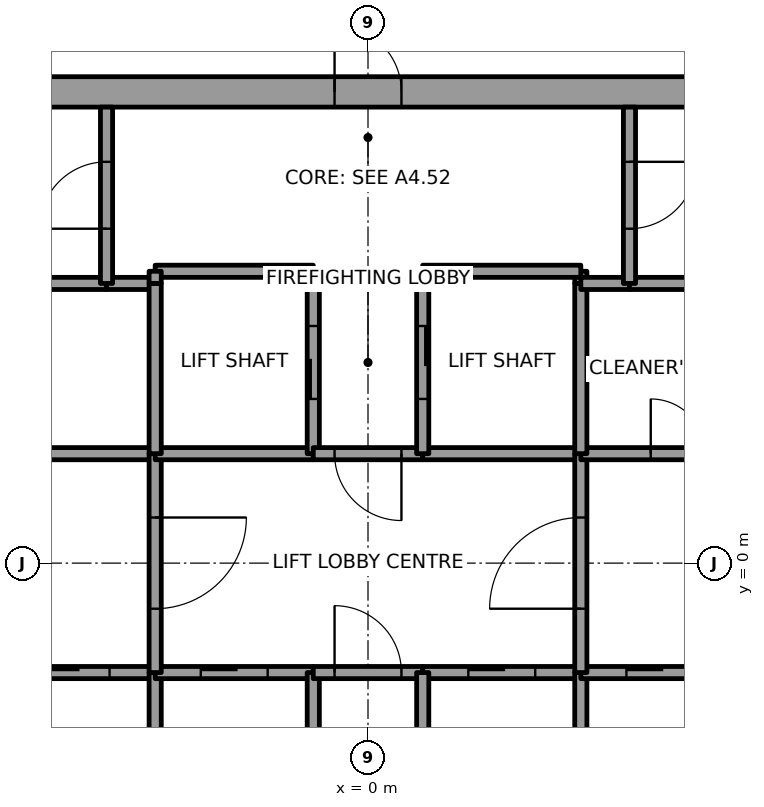
"""IFC4 building model, lengths in metres.
Left out: names, types, materials, properties, quantities, classifications, styles, units other than length and angle.
Written with IfcOpenShell. Run it as: python <this file> out.ifc"""

import sys

from ifc_helpers import new_model, si_unit, direction, frame, frame_2d, origin, place, context, subcontext, project, spatial, rectangle, extrude, element, fill, save


model = new_model("IFC4")
c1 = context("Model", 3, precision=1e-05, world=origin(), true_north=direction((0.0, 1.0)))
c2 = subcontext(c1, "Body", "Model", "MODEL_VIEW")
j1 = project(units=[si_unit("LENGTHUNIT", "METRE"), si_unit("PLANEANGLEUNIT", "RADIAN")], contexts=[c1])
p1 = place(None, origin())
s1 = spatial("IfcSite", under=j1, at=p1, CompositionType="ELEMENT")
p2 = place(p1, origin())
s2 = spatial("IfcBuilding", under=s1, at=p2, CompositionType="ELEMENT")
p3 = place(p2, frame((0.0, 0.0, 227.0)))
s3 = spatial("IfcBuildingStorey", under=s2, at=p3, CompositionType="ELEMENT", Elevation=227.0)
p4 = place(p3, frame((-11.0, 7.75, 0.0), z_axis=(0.0, 0.0, 1.0), x_axis=(1.0, 0.0, 0.0)))
e1 = element("IfcWall", 1, at=p4, inside=s3, PredefinedType="SHEAR", context=c2, shape_type="SweptSolid", body=[
    extrude(rectangle(XDim=22.0, YDim=0.5, at=frame_2d((11.0, 0.0))), origin(), (0.0, 0.0, 1.0), 4.0),
])
p5 = place(p4, frame((10.45, 0.0, 0.0)))
e2 = element("IfcOpeningElement", 2, at=p5, cuts=e1, PredefinedType="OPENING", context=c2, shape_type="SweptSolid", body=[
    extrude(rectangle(XDim=1.1, YDim=2.1, at=frame_2d((0.55, 1.05))), frame((0.0, 0.25, 0.0), z_axis=(0.0, -1.0, 0.0), x_axis=(1.0, 0.0, 0.0)), (0.0, 0.0, 1.0), 0.5),
])
p6 = place(p3, frame((-8.7, 1.8, 0.0), z_axis=(0.0, 0.0, 1.0), x_axis=(1.0, 0.0, 0.0)))
e3 = element("IfcWall", 3, at=p6, inside=s3, PredefinedType="SOLIDWALL", context=c2, shape_type="SweptSolid", body=[
    extrude(rectangle(XDim=5.2, YDim=0.2, at=frame_2d((2.6, 0.0))), origin(), (0.0, 0.0, 1.0), 3.85),
])
p7 = place(p6, frame((2.15, 0.0, 0.0)))
e4 = element("IfcOpeningElement", 4, at=p7, cuts=e3, PredefinedType="OPENING", context=c2, shape_type="SweptSolid", body=[
    extrude(rectangle(XDim=0.9, YDim=2.1, at=frame_2d((0.45, 1.05))), frame((0.0, 0.1, 0.0), z_axis=(0.0, -1.0, 0.0), x_axis=(1.0, 0.0, 0.0)), (0.0, 0.0, 1.0), 0.2),
])
p8 = place(p3, frame((-4.3, 4.6, 0.0), z_axis=(0.0, 0.0, 1.0), x_axis=(-1.0, 0.0, 0.0)))
e5 = element("IfcWall", 5, at=p8, inside=s3, PredefinedType="SOLIDWALL", context=c2, shape_type="SweptSolid", body=[
    extrude(rectangle(XDim=4.4, YDim=0.2, at=frame_2d((2.2, 0.0))), origin(), (0.0, 0.0, 1.0), 3.85),
])
p9 = place(p3, frame((-6.1, -1.8, 0.0), z_axis=(0.0, 0.0, 1.0), x_axis=(1.0, 0.0, 0.0)))
e6 = element("IfcWall", 6, at=p9, inside=s3, PredefinedType="SOLIDWALL", context=c2, shape_type="SweptSolid", body=[
    extrude(rectangle(XDim=2.6, YDim=0.2, at=frame_2d((1.3, 0.0))), origin(), (0.0, 0.0, 1.0), 3.85),
])
p10 = place(p9, frame((0.75, 0.0, 0.0)))
e7 = element("IfcOpeningElement", 7, at=p10, cuts=e6, PredefinedType="OPENING", context=c2, shape_type="SweptSolid", body=[
    extrude(rectangle(XDim=1.1, YDim=2.1, at=frame_2d((0.55, 1.05))), frame((0.0, 0.1, 0.0), z_axis=(0.0, -1.0, 0.0), x_axis=(1.0, 0.0, 0.0)), (0.0, 0.0, 1.0), 0.2),
])
p11 = place(p3, frame((-3.5, 4.6, 0.0), z_axis=(0.0, 0.0, 1.0), x_axis=(-1.0, 0.0, 0.0)))
e8 = element("IfcWall", 8, at=p11, inside=s3, PredefinedType="SOLIDWALL", context=c2, shape_type="SweptSolid", body=[
    extrude(rectangle(XDim=0.8, YDim=0.2, at=frame_2d((0.4, 0.0))), origin(), (0.0, 0.0, 1.0), 3.85),
])
p12 = place(p3, frame((-4.3, 4.6, 0.0), z_axis=(0.0, 0.0, 1.0), x_axis=(0.0, 1.0, 0.0)))
e9 = element("IfcWall", 9, at=p12, inside=s3, PredefinedType="SOLIDWALL", context=c2, shape_type="SweptSolid", body=[
    extrude(rectangle(XDim=2.9, YDim=0.2, at=frame_2d((1.45, 0.0))), origin(), (0.0, 0.0, 1.0), 3.85),
])
p13 = place(p12, frame((0.9, 0.0, 0.0)))
e10 = element("IfcOpeningElement", 10, at=p13, cuts=e9, PredefinedType="OPENING", context=c2, shape_type="SweptSolid", body=[
    extrude(rectangle(XDim=1.1, YDim=2.1, at=frame_2d((0.55, 1.05))), frame((0.0, 0.1, 0.0), z_axis=(0.0, -1.0, 0.0), x_axis=(1.0, 0.0, 0.0)), (0.0, 0.0, 1.0), 0.2),
])
p14 = place(p3, frame((-3.5, -4.6, 0.0), z_axis=(0.0, 0.0, 1.0), x_axis=(0.0, 1.0, 0.0)))
e11 = element("IfcWall", 11, at=p14, inside=s3, PredefinedType="SOLIDWALL", context=c2, shape_type="SweptSolid", body=[
    extrude(rectangle(XDim=2.8, YDim=0.2, at=frame_2d((1.4, 0.0))), origin(), (0.0, 0.0, 1.0), 3.85),
])
p15 = place(p3, frame((-3.5, -1.8, 0.0), z_axis=(0.0, 0.0, 1.0), x_axis=(1.0, 0.0, 0.0)))
e12 = element("IfcWall", 12, at=p15, inside=s3, PredefinedType="SOLIDWALL", context=c2, shape_type="SweptSolid", body=[
    extrude(rectangle(XDim=2.6, YDim=0.2, at=frame_2d((1.3, 0.0))), origin(), (0.0, 0.0, 1.0), 3.85),
])
p16 = place(p15, frame((0.75, 0.0, 0.0)))
e13 = element("IfcOpeningElement", 13, at=p16, cuts=e12, PredefinedType="OPENING", context=c2, shape_type="SweptSolid", body=[
    extrude(rectangle(XDim=1.1, YDim=2.1, at=frame_2d((0.55, 1.05))), frame((0.0, 0.1, 0.0), z_axis=(0.0, -1.0, 0.0), x_axis=(1.0, 0.0, 0.0)), (0.0, 0.0, 1.0), 0.2),
])
p17 = place(p3, frame((-3.5, 1.8, 0.0), z_axis=(0.0, 0.0, 1.0), x_axis=(0.0, -1.0, 0.0)))
e14 = element("IfcWall", 14, at=p17, inside=s3, PredefinedType="SOLIDWALL", context=c2, shape_type="SweptSolid", body=[
    extrude(rectangle(XDim=3.6, YDim=0.2, at=frame_2d((1.8, 0.0))), origin(), (0.0, 0.0, 1.0), 3.85),
])
p18 = place(p17, frame((1.05, 0.0, 0.0)))
e15 = element("IfcOpeningElement", 15, at=p18, cuts=e14, PredefinedType="OPENING", context=c2, shape_type="SweptSolid", body=[
    extrude(rectangle(XDim=1.5, YDim=2.1, at=frame_2d((0.75, 1.05))), frame((0.0, 0.1, 0.0), z_axis=(0.0, -1.0, 0.0), x_axis=(1.0, 0.0, 0.0)), (0.0, 0.0, 1.0), 0.2),
])
p19 = place(p3, frame((-0.9, 1.8, 0.0), z_axis=(0.0, 0.0, 1.0), x_axis=(-1.0, 0.0, 0.0)))
e16 = element("IfcWall", 16, at=p19, inside=s3, PredefinedType="SOLIDWALL", context=c2, shape_type="SweptSolid", body=[
    extrude(rectangle(XDim=2.6, YDim=0.2, at=frame_2d((1.3, 0.0))), origin(), (0.0, 0.0, 1.0), 3.85),
])
p20 = place(p3, frame((-3.5, 1.8, 0.0), z_axis=(0.0, 0.0, 1.0), x_axis=(0.0, 1.0, 0.0)))
e17 = element("IfcWall", 17, at=p20, inside=s3, PredefinedType="SOLIDWALL", context=c2, shape_type="SweptSolid", body=[
    extrude(rectangle(XDim=2.8, YDim=0.2, at=frame_2d((1.4, 0.0))), origin(), (0.0, 0.0, 1.0), 3.85),
])
p21 = place(p3, frame((-0.9, 1.8, 0.0), z_axis=(0.0, 0.0, 1.0), x_axis=(0.0, 1.0, 0.0)))
e18 = element("IfcWall", 18, at=p21, inside=s3, PredefinedType="SOLIDWALL", context=c2, shape_type="SweptSolid", body=[
    extrude(rectangle(XDim=3.0, YDim=0.2, at=frame_2d((1.5, 0.0))), origin(), (0.0, 0.0, 1.0), 3.85),
])
p22 = place(p21, frame((0.9, 0.0, 0.0)))
e19 = element("IfcOpeningElement", 19, at=p22, cuts=e18, PredefinedType="OPENING", context=c2, shape_type="SweptSolid", body=[
    extrude(rectangle(XDim=1.2, YDim=2.1, at=frame_2d((0.6, 1.05))), frame((0.0, 0.1, 0.0), z_axis=(0.0, -1.0, 0.0), x_axis=(1.0, 0.0, 0.0)), (0.0, 0.0, 1.0), 0.2),
])
p23 = place(p3, frame((-0.9, 4.8, 0.0), z_axis=(0.0, 0.0, 1.0), x_axis=(-1.0, 0.0, 0.0)))
e20 = element("IfcWall", 20, at=p23, inside=s3, PredefinedType="SOLIDWALL", context=c2, shape_type="SweptSolid", body=[
    extrude(rectangle(XDim=2.6, YDim=0.2, at=frame_2d((1.3, 0.0))), origin(), (0.0, 0.0, 1.0), 3.85),
])
p24 = place(p3, frame((-3.5, 4.8, 0.0), z_axis=(0.0, 0.0, 1.0), x_axis=(0.0, -1.0, 0.0)))
e21 = element("IfcWall", 21, at=p24, inside=s3, PredefinedType="SOLIDWALL", context=c2, shape_type="SweptSolid", body=[
    extrude(rectangle(XDim=0.2, YDim=0.2, at=frame_2d((0.1, 0.0))), origin(), (0.0, 0.0, 1.0), 3.85),
])
p25 = place(p3, frame((-0.9, -4.6, 0.0), z_axis=(0.0, 0.0, 1.0), x_axis=(0.0, 1.0, 0.0)))
e22 = element("IfcWall", 22, at=p25, inside=s3, PredefinedType="SOLIDWALL", context=c2, shape_type="SweptSolid", body=[
    extrude(rectangle(XDim=2.8, YDim=0.2, at=frame_2d((1.4, 0.0))), origin(), (0.0, 0.0, 1.0), 3.85),
])
p26 = place(p3, frame((-0.9, -1.8, 0.0), z_axis=(0.0, 0.0, 1.0), x_axis=(1.0, 0.0, 0.0)))
e23 = element("IfcWall", 23, at=p26, inside=s3, PredefinedType="SOLIDWALL", context=c2, shape_type="SweptSolid", body=[
    extrude(rectangle(XDim=1.8, YDim=0.2, at=frame_2d((0.9, 0.0))), origin(), (0.0, 0.0, 1.0), 3.85),
])
p27 = place(p26, frame((0.35, 0.0, 0.0)))
e24 = element("IfcOpeningElement", 24, at=p27, cuts=e23, PredefinedType="OPENING", context=c2, shape_type="SweptSolid", body=[
    extrude(rectangle(XDim=1.1, YDim=2.1, at=frame_2d((0.55, 1.05))), frame((0.0, 0.1, 0.0), z_axis=(0.0, -1.0, 0.0), x_axis=(1.0, 0.0, 0.0)), (0.0, 0.0, 1.0), 0.2),
])
p28 = place(p3, frame((0.9, 1.8, 0.0), z_axis=(0.0, 0.0, 1.0), x_axis=(-1.0, 0.0, 0.0)))
e25 = element("IfcWall", 25, at=p28, inside=s3, PredefinedType="SOLIDWALL", context=c2, shape_type="SweptSolid", body=[
    extrude(rectangle(XDim=1.8, YDim=0.2, at=frame_2d((0.9, 0.0))), origin(), (0.0, 0.0, 1.0), 3.85),
])
p29 = place(p28, frame((0.35, 0.0, 0.0)))
e26 = element("IfcOpeningElement", 26, at=p29, cuts=e25, PredefinedType="OPENING", context=c2, shape_type="SweptSolid", body=[
    extrude(rectangle(XDim=1.1, YDim=2.1, at=frame_2d((0.55, 1.05))), frame((0.0, 0.1, 0.0), z_axis=(0.0, -1.0, 0.0), x_axis=(1.0, 0.0, 0.0)), (0.0, 0.0, 1.0), 0.2),
])
p30 = place(p3, frame((0.9, -1.8, 0.0), z_axis=(0.0, 0.0, 1.0), x_axis=(1.0, 0.0, 0.0)))
e27 = element("IfcWall", 27, at=p30, inside=s3, PredefinedType="SOLIDWALL", context=c2, shape_type="SweptSolid", body=[
    extrude(rectangle(XDim=2.6, YDim=0.2, at=frame_2d((1.3, 0.0))), origin(), (0.0, 0.0, 1.0), 3.85),
])
p31 = place(p30, frame((0.75, 0.0, 0.0)))
e28 = element("IfcOpeningElement", 28, at=p31, cuts=e27, PredefinedType="OPENING", context=c2, shape_type="SweptSolid", body=[
    extrude(rectangle(XDim=1.1, YDim=2.1, at=frame_2d((0.55, 1.05))), frame((0.0, 0.1, 0.0), z_axis=(0.0, -1.0, 0.0), x_axis=(1.0, 0.0, 0.0)), (0.0, 0.0, 1.0), 0.2),
])
p32 = place(p3, frame((0.9, -1.8, 0.0), z_axis=(0.0, 0.0, 1.0), x_axis=(0.0, -1.0, 0.0)))
e29 = element("IfcWall", 29, at=p32, inside=s3, PredefinedType="SOLIDWALL", context=c2, shape_type="SweptSolid", body=[
    extrude(rectangle(XDim=2.8, YDim=0.2, at=frame_2d((1.4, 0.0))), origin(), (0.0, 0.0, 1.0), 3.85),
])
p33 = place(p3, frame((3.5, 1.8, 0.0), z_axis=(0.0, 0.0, 1.0), x_axis=(-1.0, 0.0, 0.0)))
e30 = element("IfcWall", 30, at=p33, inside=s3, PredefinedType="SOLIDWALL", context=c2, shape_type="SweptSolid", body=[
    extrude(rectangle(XDim=2.6, YDim=0.2, at=frame_2d((1.3, 0.0))), origin(), (0.0, 0.0, 1.0), 3.85),
])
p34 = place(p3, frame((3.5, 4.6, 0.0), z_axis=(0.0, 0.0, 1.0), x_axis=(0.0, 1.0, 0.0)))
e31 = element("IfcWall", 31, at=p34, inside=s3, PredefinedType="SOLIDWALL", context=c2, shape_type="SweptSolid", body=[
    extrude(rectangle(XDim=0.2, YDim=0.2, at=frame_2d((0.1, 0.0))), origin(), (0.0, 0.0, 1.0), 3.85),
])
p35 = place(p3, frame((3.5, 4.8, 0.0), z_axis=(0.0, 0.0, 1.0), x_axis=(-1.0, 0.0, 0.0)))
e32 = element("IfcWall", 32, at=p35, inside=s3, PredefinedType="SOLIDWALL", context=c2, shape_type="SweptSolid", body=[
    extrude(rectangle(XDim=2.6, YDim=0.2, at=frame_2d((1.3, 0.0))), origin(), (0.0, 0.0, 1.0), 3.85),
])
p36 = place(p3, frame((0.9, 4.8, 0.0), z_axis=(0.0, 0.0, 1.0), x_axis=(0.0, -1.0, 0.0)))
e33 = element("IfcWall", 33, at=p36, inside=s3, PredefinedType="SOLIDWALL", context=c2, shape_type="SweptSolid", body=[
    extrude(rectangle(XDim=3.0, YDim=0.2, at=frame_2d((1.5, 0.0))), origin(), (0.0, 0.0, 1.0), 3.85),
])
p37 = place(p36, frame((0.9, 0.0, 0.0)))
e34 = element("IfcOpeningElement", 34, at=p37, cuts=e33, PredefinedType="OPENING", context=c2, shape_type="SweptSolid", body=[
    extrude(rectangle(XDim=1.2, YDim=2.1, at=frame_2d((0.6, 1.05))), frame((0.0, 0.1, 0.0), z_axis=(0.0, -1.0, 0.0), x_axis=(1.0, 0.0, 0.0)), (0.0, 0.0, 1.0), 0.2),
])
p38 = place(p3, frame((3.5, -4.6, 0.0), z_axis=(0.0, 0.0, 1.0), x_axis=(0.0, 1.0, 0.0)))
e35 = element("IfcWall", 35, at=p38, inside=s3, PredefinedType="SOLIDWALL", context=c2, shape_type="SweptSolid", body=[
    extrude(rectangle(XDim=2.8, YDim=0.2, at=frame_2d((1.4, 0.0))), origin(), (0.0, 0.0, 1.0), 3.85),
])
p39 = place(p3, frame((3.5, -1.8, 0.0), z_axis=(0.0, 0.0, 1.0), x_axis=(1.0, 0.0, 0.0)))
e36 = element("IfcWall", 36, at=p39, inside=s3, PredefinedType="SOLIDWALL", context=c2, shape_type="SweptSolid", body=[
    extrude(rectangle(XDim=2.6, YDim=0.2, at=frame_2d((1.3, 0.0))), origin(), (0.0, 0.0, 1.0), 3.85),
])
p40 = place(p39, frame((0.75, 0.0, 0.0)))
e37 = element("IfcOpeningElement", 37, at=p40, cuts=e36, PredefinedType="OPENING", context=c2, shape_type="SweptSolid", body=[
    extrude(rectangle(XDim=1.1, YDim=2.1, at=frame_2d((0.55, 1.05))), frame((0.0, 0.1, 0.0), z_axis=(0.0, -1.0, 0.0), x_axis=(1.0, 0.0, 0.0)), (0.0, 0.0, 1.0), 0.2),
])
p41 = place(p3, frame((3.5, -1.8, 0.0), z_axis=(0.0, 0.0, 1.0), x_axis=(0.0, 1.0, 0.0)))
e38 = element("IfcWall", 38, at=p41, inside=s3, PredefinedType="SOLIDWALL", context=c2, shape_type="SweptSolid", body=[
    extrude(rectangle(XDim=3.6, YDim=0.2, at=frame_2d((1.8, 0.0))), origin(), (0.0, 0.0, 1.0), 3.85),
])
p42 = place(p41, frame((1.05, 0.0, 0.0)))
e39 = element("IfcOpeningElement", 39, at=p42, cuts=e38, PredefinedType="OPENING", context=c2, shape_type="SweptSolid", body=[
    extrude(rectangle(XDim=1.5, YDim=2.1, at=frame_2d((0.75, 1.05))), frame((0.0, 0.1, 0.0), z_axis=(0.0, -1.0, 0.0), x_axis=(1.0, 0.0, 0.0)), (0.0, 0.0, 1.0), 0.2),
])
p43 = place(p3, frame((3.5, 1.8, 0.0), z_axis=(0.0, 0.0, 1.0), x_axis=(1.0, 0.0, 0.0)))
e40 = element("IfcWall", 40, at=p43, inside=s3, PredefinedType="SOLIDWALL", context=c2, shape_type="SweptSolid", body=[
    extrude(rectangle(XDim=3.2, YDim=0.2, at=frame_2d((1.6, 0.0))), origin(), (0.0, 0.0, 1.0), 3.85),
])
p44 = place(p43, frame((1.15, 0.0, 0.0)))
e41 = element("IfcOpeningElement", 41, at=p44, cuts=e40, PredefinedType="OPENING", context=c2, shape_type="SweptSolid", body=[
    extrude(rectangle(XDim=0.9, YDim=2.1, at=frame_2d((0.45, 1.05))), frame((0.0, 0.1, 0.0), z_axis=(0.0, -1.0, 0.0), x_axis=(1.0, 0.0, 0.0)), (0.0, 0.0, 1.0), 0.2),
])
p45 = place(p3, frame((3.5, 4.6, 0.0), z_axis=(0.0, 0.0, 1.0), x_axis=(0.0, -1.0, 0.0)))
e42 = element("IfcWall", 42, at=p45, inside=s3, PredefinedType="SOLIDWALL", context=c2, shape_type="SweptSolid", body=[
    extrude(rectangle(XDim=2.8, YDim=0.2, at=frame_2d((1.4, 0.0))), origin(), (0.0, 0.0, 1.0), 3.85),
])
p46 = place(p3, frame((4.3, 4.6, 0.0), z_axis=(0.0, 0.0, 1.0), x_axis=(-1.0, 0.0, 0.0)))
e43 = element("IfcWall", 43, at=p46, inside=s3, PredefinedType="SOLIDWALL", context=c2, shape_type="SweptSolid", body=[
    extrude(rectangle(XDim=0.8, YDim=0.2, at=frame_2d((0.4, 0.0))), origin(), (0.0, 0.0, 1.0), 3.85),
])
p47 = place(p3, frame((6.7, 4.6, 0.0), z_axis=(0.0, 0.0, 1.0), x_axis=(-1.0, 0.0, 0.0)))
e44 = element("IfcWall", 44, at=p47, inside=s3, PredefinedType="SOLIDWALL", context=c2, shape_type="SweptSolid", body=[
    extrude(rectangle(XDim=2.4, YDim=0.2, at=frame_2d((1.2, 0.0))), origin(), (0.0, 0.0, 1.0), 3.85),
])
p48 = place(p3, frame((4.3, 7.5, 0.0), z_axis=(0.0, 0.0, 1.0), x_axis=(0.0, -1.0, 0.0)))
e45 = element("IfcWall", 45, at=p48, inside=s3, PredefinedType="SOLIDWALL", context=c2, shape_type="SweptSolid", body=[
    extrude(rectangle(XDim=2.9, YDim=0.2, at=frame_2d((1.45, 0.0))), origin(), (0.0, 0.0, 1.0), 3.85),
])
p49 = place(p48, frame((0.9, 0.0, 0.0)))
e46 = element("IfcOpeningElement", 46, at=p49, cuts=e45, PredefinedType="OPENING", context=c2, shape_type="SweptSolid", body=[
    extrude(rectangle(XDim=1.1, YDim=2.1, at=frame_2d((0.55, 1.05))), frame((0.0, 0.1, 0.0), z_axis=(0.0, -1.0, 0.0), x_axis=(1.0, 0.0, 0.0)), (0.0, 0.0, 1.0), 0.2),
])
p50 = place(p10, origin())
e47 = element("IfcDoor", 47, at=p50, inside=s3, OperationType="SLIDING_TO_RIGHT", PredefinedType="DOOR", context=c2, shape_type="SweptSolid", body=[
    extrude(rectangle(XDim=1.1, YDim=2.1, at=frame_2d((0.55, 1.05))), frame((0.0, 0.025, 0.0), z_axis=(0.0, -1.0, 0.0), x_axis=(1.0, 0.0, 0.0)), (0.0, 0.0, 1.0), 0.05),
])
fill(e7, e47)
p51 = place(p16, origin())
e48 = element("IfcDoor", 48, at=p51, inside=s3, OperationType="SLIDING_TO_RIGHT", PredefinedType="DOOR", context=c2, shape_type="SweptSolid", body=[
    extrude(rectangle(XDim=1.1, YDim=2.1, at=frame_2d((0.55, 1.05))), frame((0.0, 0.025, 0.0), z_axis=(0.0, -1.0, 0.0), x_axis=(1.0, 0.0, 0.0)), (0.0, 0.0, 1.0), 0.05),
])
fill(e13, e48)
p52 = place(p31, origin())
e49 = element("IfcDoor", 49, at=p52, inside=s3, OperationType="SLIDING_TO_LEFT", PredefinedType="DOOR", context=c2, shape_type="SweptSolid", body=[
    extrude(rectangle(XDim=1.1, YDim=2.1, at=frame_2d((0.55, 1.05))), frame((0.0, 0.025, 0.0), z_axis=(0.0, -1.0, 0.0), x_axis=(1.0, 0.0, 0.0)), (0.0, 0.0, 1.0), 0.05),
])
fill(e28, e49)
p53 = place(p40, origin())
e50 = element("IfcDoor", 50, at=p53, inside=s3, OperationType="SLIDING_TO_RIGHT", PredefinedType="DOOR", context=c2, shape_type="SweptSolid", body=[
    extrude(rectangle(XDim=1.1, YDim=2.1, at=frame_2d((0.55, 1.05))), frame((0.0, 0.025, 0.0), z_axis=(0.0, -1.0, 0.0), x_axis=(1.0, 0.0, 0.0)), (0.0, 0.0, 1.0), 0.05),
])
fill(e37, e50)
p54 = place(p22, origin())
e51 = element("IfcDoor", 51, at=p54, inside=s3, OperationType="SLIDING_TO_LEFT", PredefinedType="DOOR", context=c2, shape_type="SweptSolid", body=[
    extrude(rectangle(XDim=1.2, YDim=2.1, at=frame_2d((0.6, 1.05))), frame((0.0, 0.025, 0.0), z_axis=(0.0, -1.0, 0.0), x_axis=(1.0, 0.0, 0.0)), (0.0, 0.0, 1.0), 0.05),
])
fill(e19, e51)
p55 = place(p37, origin())
e52 = element("IfcDoor", 52, at=p55, inside=s3, OperationType="SLIDING_TO_RIGHT", PredefinedType="DOOR", context=c2, shape_type="SweptSolid", body=[
    extrude(rectangle(XDim=1.2, YDim=2.1, at=frame_2d((0.6, 1.05))), frame((0.0, 0.025, 0.0), z_axis=(0.0, -1.0, 0.0), x_axis=(1.0, 0.0, 0.0)), (0.0, 0.0, 1.0), 0.05),
])
fill(e34, e52)
p56 = place(p18, origin())
e53 = element("IfcDoor", 53, at=p56, inside=s3, OperationType="DOUBLE_DOOR_SINGLE_SWING", PredefinedType="DOOR", context=c2, shape_type="SweptSolid", body=[
    extrude(rectangle(XDim=1.5, YDim=2.1, at=frame_2d((0.75, 1.05))), frame((0.0, 0.025, 0.0), z_axis=(0.0, -1.0, 0.0), x_axis=(1.0, 0.0, 0.0)), (0.0, 0.0, 1.0), 0.05),
])
fill(e15, e53)
p57 = place(p42, origin())
e54 = element("IfcDoor", 54, at=p57, inside=s3, OperationType="DOUBLE_DOOR_SINGLE_SWING", PredefinedType="DOOR", context=c2, shape_type="SweptSolid", body=[
    extrude(rectangle(XDim=1.5, YDim=2.1, at=frame_2d((0.75, 1.05))), frame((0.0, 0.025, 0.0), z_axis=(0.0, -1.0, 0.0), x_axis=(1.0, 0.0, 0.0)), (0.0, 0.0, 1.0), 0.05),
])
fill(e39, e54)
p58 = place(p29, origin())
e55 = element("IfcDoor", 55, at=p58, inside=s3, OperationType="SINGLE_SWING_RIGHT", PredefinedType="DOOR", context=c2, shape_type="SweptSolid", body=[
    extrude(rectangle(XDim=1.1, YDim=2.1, at=frame_2d((0.55, 1.05))), frame((0.0, 0.025, 0.0), z_axis=(0.0, -1.0, 0.0), x_axis=(1.0, 0.0, 0.0)), (0.0, 0.0, 1.0), 0.05),
])
fill(e26, e55)
p59 = place(p27, origin())
e56 = element("IfcDoor", 56, at=p59, inside=s3, OperationType="SINGLE_SWING_RIGHT", PredefinedType="DOOR", context=c2, shape_type="SweptSolid", body=[
    extrude(rectangle(XDim=1.1, YDim=2.1, at=frame_2d((0.55, 1.05))), frame((0.0, 0.025, 0.0), z_axis=(0.0, -1.0, 0.0), x_axis=(1.0, 0.0, 0.0)), (0.0, 0.0, 1.0), 0.05),
])
fill(e24, e56)
p60 = place(p13, origin())
e57 = element("IfcDoor", 57, at=p60, inside=s3, OperationType="SINGLE_SWING_LEFT", PredefinedType="DOOR", context=c2, shape_type="SweptSolid", body=[
    extrude(rectangle(XDim=1.1, YDim=2.1, at=frame_2d((0.55, 1.05))), frame((0.0, 0.025, 0.0), z_axis=(0.0, -1.0, 0.0), x_axis=(1.0, 0.0, 0.0)), (0.0, 0.0, 1.0), 0.05),
])
fill(e10, e57)
p61 = place(p49, origin())
e58 = element("IfcDoor", 58, at=p61, inside=s3, OperationType="SINGLE_SWING_LEFT", PredefinedType="DOOR", context=c2, shape_type="SweptSolid", body=[
    extrude(rectangle(XDim=1.1, YDim=2.1, at=frame_2d((0.55, 1.05))), frame((0.0, 0.025, 0.0), z_axis=(0.0, -1.0, 0.0), x_axis=(1.0, 0.0, 0.0)), (0.0, 0.0, 1.0), 0.05),
])
fill(e46, e58)
p62 = place(p44, origin())
e59 = element("IfcDoor", 59, at=p62, inside=s3, OperationType="SINGLE_SWING_LEFT", PredefinedType="DOOR", context=c2, shape_type="SweptSolid", body=[
    extrude(rectangle(XDim=0.9, YDim=2.1, at=frame_2d((0.45, 1.05))), frame((0.0, 0.025, 0.0), z_axis=(0.0, -1.0, 0.0), x_axis=(1.0, 0.0, 0.0)), (0.0, 0.0, 1.0), 0.05),
])
fill(e41, e59)
p63 = place(p5, origin())
e60 = element("IfcDoor", 60, at=p63, inside=s3, OperationType="SINGLE_SWING_LEFT", PredefinedType="DOOR", context=c2, shape_type="SweptSolid", body=[
    extrude(rectangle(XDim=1.1, YDim=2.1, at=frame_2d((0.55, 1.05))), frame((0.0, 0.025, 0.0), z_axis=(0.0, -1.0, 0.0), x_axis=(1.0, 0.0, 0.0)), (0.0, 0.0, 1.0), 0.05),
])
fill(e2, e60)
save(model, sys.argv[1])
